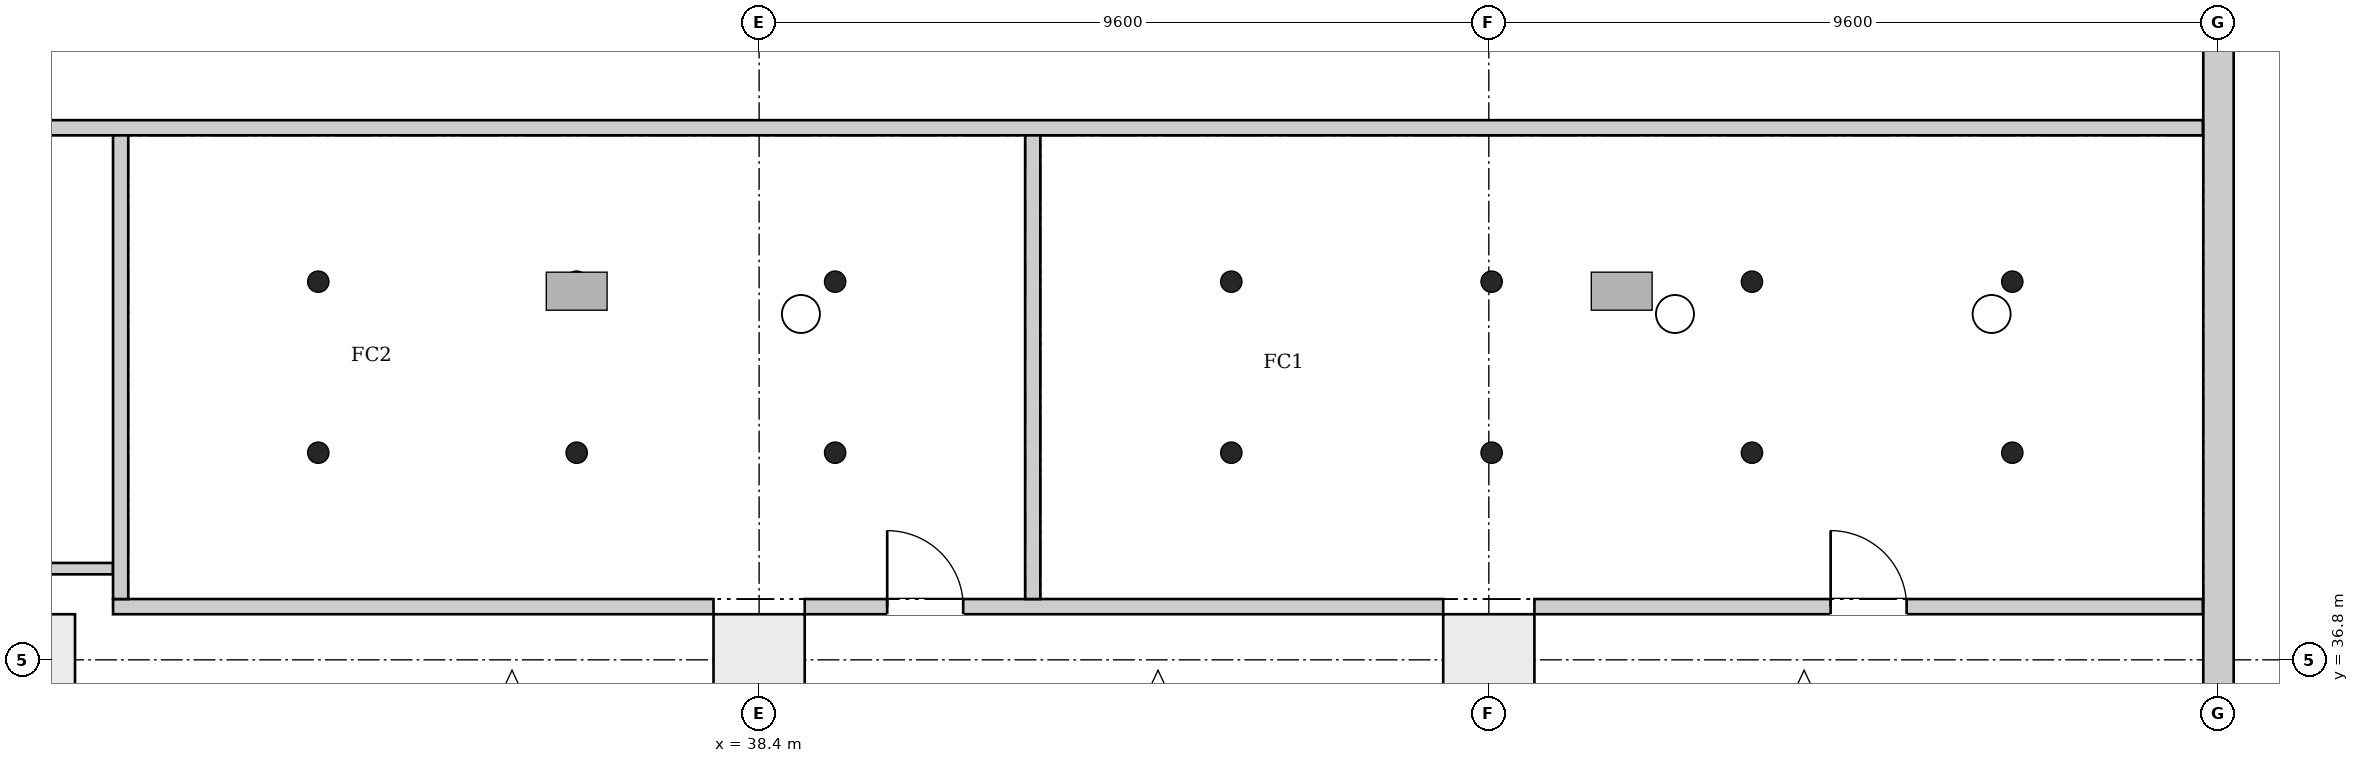
"""IFC4 building model, lengths in metres.
Left out: names, types, materials, properties, quantities, classifications, styles, units other than length and angle.
Written with IfcOpenShell. Run it as: python <this file> out.ifc"""

import sys

from ifc_helpers import new_model, si_unit, direction, frame, frame_2d, origin, origin_2d, place, context, subcontext, project, spatial, rectangle, extrude, element, fill, save


model = new_model("IFC4")
c1 = context("Model", 3, precision=1e-05, world=origin(), true_north=direction((0.0, 1.0)))
c2 = subcontext(c1, "Body", "Model", "MODEL_VIEW")
j1 = project(units=[si_unit("LENGTHUNIT", "METRE"), si_unit("PLANEANGLEUNIT", "RADIAN")], contexts=[c1])
p1 = place(None, origin())
s1 = spatial("IfcSite", under=j1, at=p1, CompositionType="ELEMENT")
p2 = place(p1, origin())
s2 = spatial("IfcBuilding", under=s1, at=p2, CompositionType="ELEMENT")
p3 = place(p2, frame((0.0, 0.0, 21.7)))
s3 = spatial("IfcBuildingStorey", under=s2, at=p3, CompositionType="ELEMENT", Elevation=21.7)
p4 = place(p3, frame((57.6, -0.2, 0.0), z_axis=(0.0, 0.0, 1.0), x_axis=(0.0, 1.0, 0.0)))
e1 = element("IfcWall", 1, at=p4, inside=s3, PredefinedType="SHEAR", context=c2, shape_type="SweptSolid", body=[
    extrude(rectangle(XDim=46.88, YDim=0.4, at=frame_2d((23.44, 0.0))), origin(), (0.0, 0.0, 1.0), 5.0),
])
for number, where, z_axis, x_axis in (
    (2, (28.8, 36.8, 0.0), (0.0, 0.0, 1.0), (1.0, 0.0, 0.0)),
    (3, (38.4, 36.8, 0.0), (0.0, 0.0, 1.0), (1.0, 0.0, 0.0)),
    (4, (48.0, 36.8, 0.0), (0.0, 0.0, 1.0), (1.0, 0.0, 0.0)),
):
    element("IfcColumn", number, at=place(p3, frame(where, z_axis=z_axis, x_axis=x_axis)), inside=s3, PredefinedType="COLUMN", context=c2, shape_type="SweptSolid", body=[
        extrude(rectangle(XDim=1.2, YDim=1.2, at=origin_2d()), origin(), (0.0, 0.0, 1.0), 5.0),
    ])
p5 = place(p3, frame((28.006, 38.0, 0.0), z_axis=(0.0, 0.0, 1.0), x_axis=(1.0, 0.0, 0.0)))
e5 = element("IfcWall", 5, at=p5, inside=s3, PredefinedType="PARTITIONING", context=c2, shape_type="SweptSolid", body=[
    extrude(rectangle(XDim=1.894, YDim=0.15, at=frame_2d((0.947, 0.0))), origin(), (0.0, 0.0, 1.0), 4.65),
])
p6 = place(p3, frame((28.006, 43.8, 0.0), z_axis=(0.0, 0.0, 1.0), x_axis=(1.0, 0.0, 0.0)))
e6 = element("IfcWall", 6, at=p6, inside=s3, PredefinedType="PARTITIONING", context=c2, shape_type="SweptSolid", body=[
    extrude(rectangle(XDim=29.388, YDim=0.2, at=frame_2d((14.694, 0.0))), origin(), (0.0, 0.0, 1.0), 4.65),
])
p7 = place(p3, frame((29.9, 37.5, 0.0), z_axis=(0.0, 0.0, 1.0), x_axis=(1.0, 0.0, 0.0)))
e7 = element("IfcWall", 7, at=p7, inside=s3, PredefinedType="PARTITIONING", context=c2, shape_type="SweptSolid", body=[
    extrude(rectangle(XDim=7.9, YDim=0.2, at=frame_2d((3.95, 0.0))), origin(), (0.0, 0.0, 1.0), 4.65),
])
p8 = place(p3, frame((30.0, 37.6, 0.0), z_axis=(0.0, 0.0, 1.0), x_axis=(0.0, 1.0, 0.0)))
e8 = element("IfcWall", 8, at=p8, inside=s3, PredefinedType="PARTITIONING", context=c2, shape_type="SweptSolid", body=[
    extrude(rectangle(XDim=6.1, YDim=0.2, at=frame_2d((3.05, 0.0))), origin(), (0.0, 0.0, 1.0), 4.65),
])
p9 = place(p3, frame((39.0, 37.5, 0.0), z_axis=(0.0, 0.0, 1.0), x_axis=(1.0, 0.0, 0.0)))
e9 = element("IfcWall", 9, at=p9, inside=s3, PredefinedType="PARTITIONING", context=c2, shape_type="SweptSolid", body=[
    extrude(rectangle(XDim=8.4, YDim=0.2, at=frame_2d((4.2, 0.0))), origin(), (0.0, 0.0, 1.0), 4.65),
])
p10 = place(p9, frame((1.085, 0.0, 0.0)))
e10 = element("IfcOpeningElement", 10, at=p10, cuts=e9, PredefinedType="OPENING", context=c2, shape_type="SweptSolid", body=[
    extrude(rectangle(XDim=1.0, YDim=2.1, at=frame_2d((0.5, 1.05))), frame((0.0, 0.11, 0.0), z_axis=(0.0, -1.0, 0.0), x_axis=(1.0, 0.0, 0.0)), (0.0, 0.0, 1.0), 0.22),
])
p11 = place(p3, frame((42.0, 37.6, 0.0), z_axis=(0.0, 0.0, 1.0), x_axis=(0.0, 1.0, 0.0)))
e11 = element("IfcWall", 11, at=p11, inside=s3, PredefinedType="PARTITIONING", context=c2, shape_type="SweptSolid", body=[
    extrude(rectangle(XDim=6.1, YDim=0.2, at=frame_2d((3.05, 0.0))), origin(), (0.0, 0.0, 1.0), 4.65),
])
p12 = place(p3, frame((48.6, 37.5, 0.0), z_axis=(0.0, 0.0, 1.0), x_axis=(1.0, 0.0, 0.0)))
e12 = element("IfcWall", 12, at=p12, inside=s3, PredefinedType="PARTITIONING", context=c2, shape_type="SweptSolid", body=[
    extrude(rectangle(XDim=8.794, YDim=0.2, at=frame_2d((4.397, 0.0))), origin(), (0.0, 0.0, 1.0), 4.65),
])
p13 = place(p12, frame((3.897, 0.0, 0.0)))
e13 = element("IfcOpeningElement", 13, at=p13, cuts=e12, PredefinedType="OPENING", context=c2, shape_type="SweptSolid", body=[
    extrude(rectangle(XDim=1.0, YDim=2.1, at=frame_2d((0.5, 1.05))), frame((0.0, 0.11, 0.0), z_axis=(0.0, -1.0, 0.0), x_axis=(1.0, 0.0, 0.0)), (0.0, 0.0, 1.0), 0.22),
])
p14 = place(p10, origin())
e14 = element("IfcDoor", 14, at=p14, inside=s3, OperationType="SINGLE_SWING_RIGHT", PredefinedType="DOOR", context=c2, shape_type="SweptSolid", body=[
    extrude(rectangle(XDim=1.0, YDim=2.1, at=frame_2d((0.5, 1.05))), frame((0.0, 0.025, 0.0), z_axis=(0.0, -1.0, 0.0), x_axis=(1.0, 0.0, 0.0)), (0.0, 0.0, 1.0), 0.05),
])
fill(e10, e14)
p15 = place(p13, origin())
e15 = element("IfcDoor", 15, at=p15, inside=s3, OperationType="SINGLE_SWING_LEFT", PredefinedType="DOOR", context=c2, shape_type="SweptSolid", body=[
    extrude(rectangle(XDim=1.0, YDim=2.1, at=frame_2d((0.5, 1.05))), frame((0.0, 0.025, 0.0), z_axis=(0.0, -1.0, 0.0), x_axis=(1.0, 0.0, 0.0)), (0.0, 0.0, 1.0), 0.05),
])
fill(e13, e15)
save(model, sys.argv[1])
